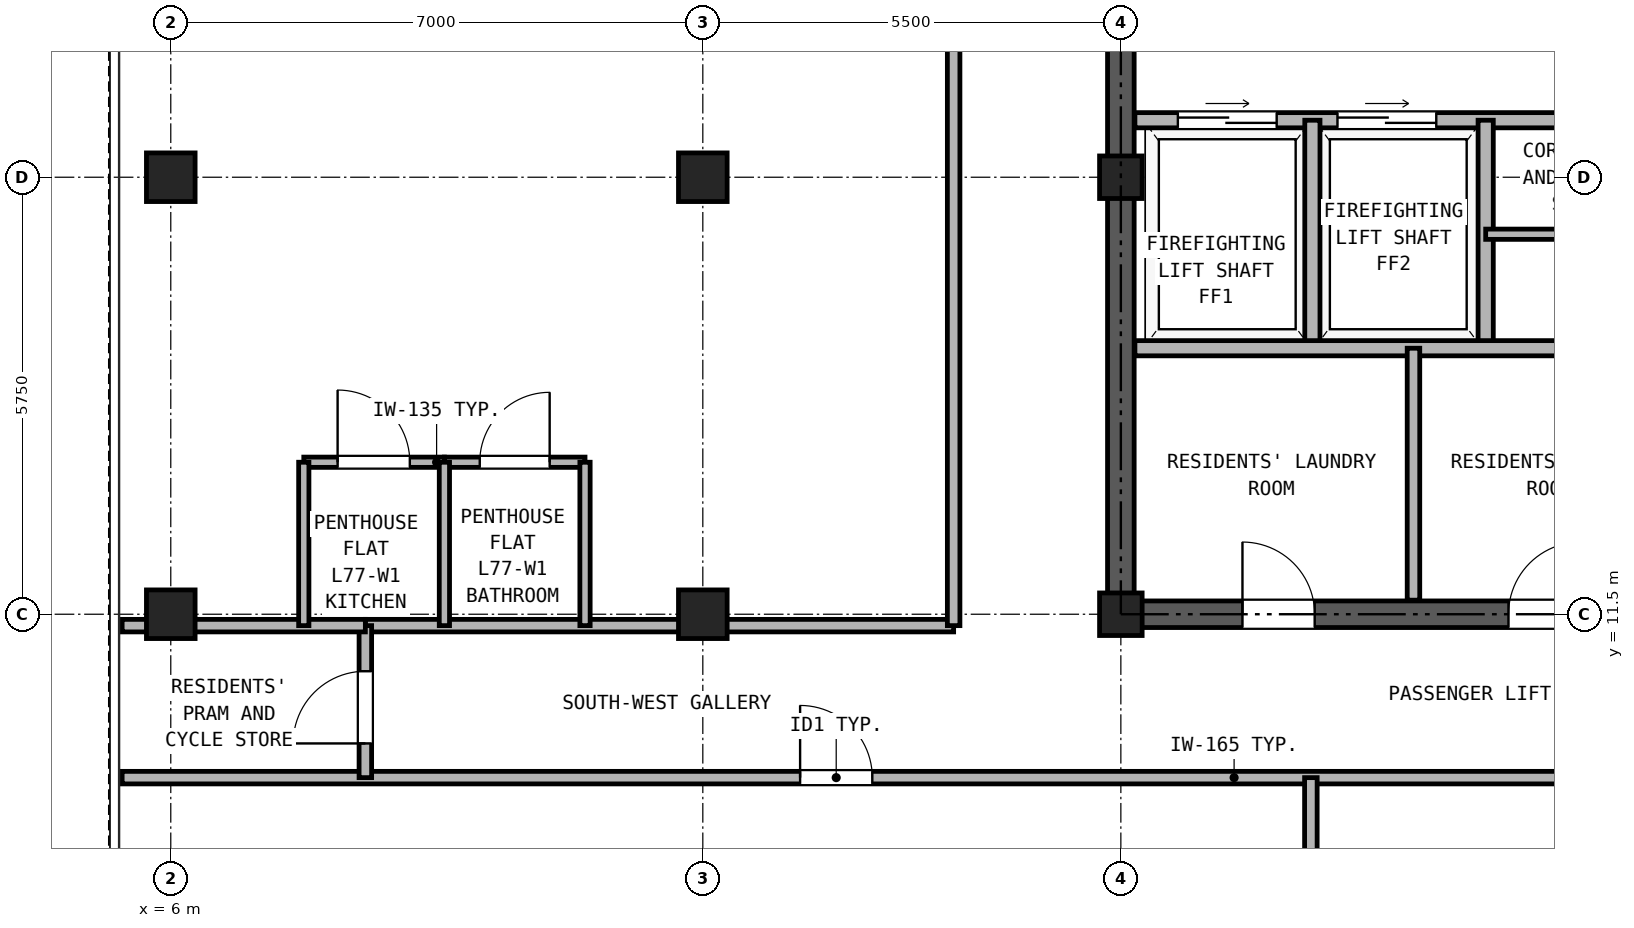
"""IFC4 building model, lengths in metres.
Left out: names, types, materials, properties, quantities, classifications, styles, units other than length and angle.
Written with IfcOpenShell. Run it as: python <this file> out.ifc"""

import sys

from ifc_helpers import new_model, si_unit, direction, frame, frame_2d, origin, origin_2d, place, context, subcontext, project, spatial, rectangle, hollow_rectangle, extrude, source, transform, mapped, element, fill, save


model = new_model("IFC4")
c1 = context("Model", 3, precision=1e-05, world=origin(), true_north=direction((0.0, 1.0)))
c2 = subcontext(c1, "Body", "Model", "MODEL_VIEW")
j1 = project(units=[si_unit("LENGTHUNIT", "METRE"), si_unit("PLANEANGLEUNIT", "RADIAN")], contexts=[c1])
p1 = place(None, origin())
s1 = spatial("IfcSite", under=j1, at=p1, CompositionType="ELEMENT")
p2 = place(p1, origin())
s2 = spatial("IfcBuilding", under=s1, at=p2, CompositionType="ELEMENT")
p3 = place(p2, frame((0.0, 0.0, 268.1)))
s3 = spatial("IfcBuildingStorey", under=s2, at=p3, CompositionType="ELEMENT", Elevation=268.1)
m1 = source(origin(), c2, "Body", "SweptSolid", [
    extrude(hollow_rectangle(XDim=0.64, YDim=0.64, WallThickness=0.035, at=origin_2d()), origin(), (0.0, 0.0, 1.0), 2.98),
])
for number, where, z_axis, x_axis in (
    (1, (6.0, 11.5, 0.0), (0.0, 0.0, 1.0), (1.0, 0.0, 0.0)),
    (2, (6.0, 17.25, 0.0), (0.0, 0.0, 1.0), (1.0, 0.0, 0.0)),
    (3, (13.0, 11.5, 0.0), (0.0, 0.0, 1.0), (1.0, 0.0, 0.0)),
    (4, (13.0, 17.25, 0.0), (0.0, 0.0, 1.0), (1.0, 0.0, 0.0)),
):
    element("IfcColumn", number, at=place(p3, frame(where, z_axis=z_axis, x_axis=x_axis)), inside=s3, PredefinedType="COLUMN", context=c2, shape_type="MappedRepresentation", body=[
        mapped(m1, transform((0.0, 0.0, 0.0), x_axis=(1.0, 0.0, 0.0), y_axis=(0.0, 1.0, 0.0), z_axis=(0.0, 0.0, 1.0), scale=1.0)),
    ])
m2 = source(origin(), c2, "Body", "SweptSolid", [
    extrude(hollow_rectangle(XDim=0.56, YDim=0.56, WallThickness=0.03, at=origin_2d()), origin(), (0.0, 0.0, 1.0), 2.98),
])
for number, where, z_axis, x_axis in (
    (5, (18.5, 11.5, 0.0), (0.0, 0.0, 1.0), (1.0, 0.0, 0.0)),
    (6, (18.5, 17.25, 0.0), (0.0, 0.0, 1.0), (1.0, 0.0, 0.0)),
):
    element("IfcColumn", number, at=place(p3, frame(where, z_axis=z_axis, x_axis=x_axis)), inside=s3, PredefinedType="COLUMN", context=c2, shape_type="MappedRepresentation", body=[
        mapped(m2, transform((0.0, 0.0, 0.0), x_axis=(1.0, 0.0, 0.0), y_axis=(0.0, 1.0, 0.0), z_axis=(0.0, 0.0, 1.0), scale=1.0)),
    ])
p4 = place(p3, frame((18.325, 11.5, 0.0), z_axis=(0.0, 0.0, 1.0), x_axis=(1.0, 0.0, 0.0)))
e7 = element("IfcWall", 7, at=p4, inside=s3, PredefinedType="SHEAR", context=c2, shape_type="SweptSolid", body=[
    extrude(rectangle(XDim=10.35, YDim=0.35, at=frame_2d((5.175, 0.0))), origin(), (0.0, 0.0, 1.0), 2.98),
])
p5 = place(p4, frame((1.775, 0.0, 0.0)))
e8 = element("IfcOpeningElement", 8, at=p5, cuts=e7, PredefinedType="OPENING", context=c2, shape_type="SweptSolid", body=[
    extrude(rectangle(XDim=0.95, YDim=2.15, at=frame_2d((0.475, 1.075))), frame((0.0, 0.185, 0.0), z_axis=(0.0, -1.0, 0.0), x_axis=(1.0, 0.0, 0.0)), (0.0, 0.0, 1.0), 0.37),
])
p6 = place(p4, frame((5.275, 0.0, 0.0)))
e9 = element("IfcOpeningElement", 9, at=p6, cuts=e7, PredefinedType="OPENING", context=c2, shape_type="SweptSolid", body=[
    extrude(rectangle(XDim=0.95, YDim=2.15, at=frame_2d((0.475, 1.075))), frame((0.0, 0.185, 0.0), z_axis=(0.0, -1.0, 0.0), x_axis=(1.0, 0.0, 0.0)), (0.0, 0.0, 1.0), 0.37),
])
p7 = place(p4, frame((8.175, 0.0, 0.0)))
e10 = element("IfcOpeningElement", 10, at=p7, cuts=e7, PredefinedType="OPENING", context=c2, shape_type="SweptSolid", body=[
    extrude(rectangle(XDim=1.1, YDim=2.25, at=frame_2d((0.55, 1.125))), frame((0.0, 0.185, 0.0), z_axis=(0.0, -1.0, 0.0), x_axis=(1.0, 0.0, 0.0)), (0.0, 0.0, 1.0), 0.37),
])
p8 = place(p3, frame((18.5, 11.675, 0.0), z_axis=(0.0, 0.0, 1.0), x_axis=(0.0, 1.0, 0.0)))
e11 = element("IfcWall", 11, at=p8, inside=s3, PredefinedType="SHEAR", context=c2, shape_type="SweptSolid", body=[
    extrude(rectangle(XDim=16.9, YDim=0.35, at=frame_2d((8.45, 0.0))), origin(), (0.0, 0.0, 1.0), 2.98),
])
p9 = place(p8, frame((7.475, 0.0, 0.0)))
e12 = element("IfcOpeningElement", 12, at=p9, cuts=e11, PredefinedType="OPENING", context=c2, shape_type="SweptSolid", body=[
    extrude(rectangle(XDim=1.15, YDim=2.2, at=frame_2d((0.575, 1.1))), frame((0.0, 0.185, 0.0), z_axis=(0.0, -1.0, 0.0), x_axis=(1.0, 0.0, 0.0)), (0.0, 0.0, 1.0), 0.37),
])
p10 = place(p3, frame((18.685, 18.0, 0.0), z_axis=(0.0, 0.0, 1.0), x_axis=(1.0, 0.0, 0.0)))
e13 = element("IfcWall", 13, at=p10, inside=s3, PredefinedType="PARTITIONING", context=c2, shape_type="SweptSolid", body=[
    extrude(rectangle(XDim=9.63, YDim=0.2, at=frame_2d((4.815, 0.0))), origin(), (0.0, 0.0, 1.0), 2.98),
])
p11 = place(p10, frame((0.565, 0.0, 0.0)))
e14 = element("IfcOpeningElement", 14, at=p11, cuts=e13, PredefinedType="OPENING", context=c2, shape_type="SweptSolid", body=[
    extrude(rectangle(XDim=1.3, YDim=2.3, at=frame_2d((0.65, 1.15))), frame((0.0, 0.11, 0.0), z_axis=(0.0, -1.0, 0.0), x_axis=(1.0, 0.0, 0.0)), (0.0, 0.0, 1.0), 0.22),
])
p12 = place(p10, frame((2.665, 0.0, 0.0)))
e15 = element("IfcOpeningElement", 15, at=p12, cuts=e13, PredefinedType="OPENING", context=c2, shape_type="SweptSolid", body=[
    extrude(rectangle(XDim=1.3, YDim=2.3, at=frame_2d((0.65, 1.15))), frame((0.0, 0.11, 0.0), z_axis=(0.0, -1.0, 0.0), x_axis=(1.0, 0.0, 0.0)), (0.0, 0.0, 1.0), 0.22),
])
p13 = place(p10, frame((7.165, 0.0, 0.0)))
e16 = element("IfcOpeningElement", 16, at=p13, cuts=e13, PredefinedType="OPENING", context=c2, shape_type="SweptSolid", body=[
    extrude(rectangle(XDim=1.0, YDim=2.15, at=frame_2d((0.5, 1.075))), frame((0.0, 0.11, 0.0), z_axis=(0.0, -1.0, 0.0), x_axis=(1.0, 0.0, 0.0)), (0.0, 0.0, 1.0), 0.22),
])
for number, where, z_axis, x_axis in (
    (17, (21.02, 15.0, 0.0), (0.0, 0.0, 1.0), (0.0, 1.0, 0.0)),
    (18, (23.3, 15.0, 0.0), (0.0, 0.0, 1.0), (0.0, 1.0, 0.0)),
):
    element("IfcWall", number, at=place(p3, frame(where, z_axis=z_axis, x_axis=x_axis)), inside=s3, PredefinedType="PARTITIONING", context=c2, shape_type="SweptSolid", body=[
        extrude(rectangle(XDim=3.0, YDim=0.2, at=frame_2d((1.5, 0.0))), origin(), (0.0, 0.0, 1.0), 2.98),
    ])
p14 = place(p3, frame((18.685, 15.0, 0.0), z_axis=(0.0, 0.0, 1.0), x_axis=(1.0, 0.0, 0.0)))
e19 = element("IfcWall", 19, at=p14, inside=s3, PredefinedType="PARTITIONING", context=c2, shape_type="SweptSolid", body=[
    extrude(rectangle(XDim=9.63, YDim=0.2, at=frame_2d((4.815, 0.0))), origin(), (0.0, 0.0, 1.0), 2.98),
])
p15 = place(p3, frame((23.3, 16.5, 0.0), z_axis=(0.0, 0.0, 1.0), x_axis=(1.0, 0.0, 0.0)))
e20 = element("IfcWall", 20, at=p15, inside=s3, PredefinedType="PARTITIONING", context=c2, shape_type="SweptSolid", body=[
    extrude(rectangle(XDim=5.015, YDim=0.135, at=frame_2d((2.507, 0.0))), origin(), (0.0, 0.0, 1.0), 2.98),
])
p16 = place(p15, frame((2.55, 0.0, 0.0)))
e21 = element("IfcOpeningElement", 21, at=p16, cuts=e20, PredefinedType="OPENING", context=c2, shape_type="SweptSolid", body=[
    extrude(rectangle(XDim=0.9, YDim=2.05, at=frame_2d((0.45, 1.025))), frame((0.0, 0.077, 0.0), z_axis=(0.0, -1.0, 0.0), x_axis=(1.0, 0.0, 0.0)), (0.0, 0.0, 1.0), 0.155),
])
p17 = place(p3, frame((22.35, 11.685, 0.0), z_axis=(0.0, 0.0, 1.0), x_axis=(0.0, 1.0, 0.0)))
e22 = element("IfcWall", 22, at=p17, inside=s3, PredefinedType="PARTITIONING", context=c2, shape_type="SweptSolid", body=[
    extrude(rectangle(XDim=3.315, YDim=0.165, at=frame_2d((1.657, 0.0))), origin(), (0.0, 0.0, 1.0), 2.98),
])
p18 = place(p3, frame((5.36, 9.35, 0.0), z_axis=(0.0, 0.0, 1.0), x_axis=(1.0, 0.0, 0.0)))
e23 = element("IfcWall", 23, at=p18, inside=s3, PredefinedType="PARTITIONING", context=c2, shape_type="SweptSolid", body=[
    extrude(rectangle(XDim=36.28, YDim=0.165, at=frame_2d((18.14, 0.0))), origin(), (0.0, 0.0, 1.0), 2.98),
])
p19 = place(p18, frame((8.92, 0.0, 0.0)))
e24 = element("IfcOpeningElement", 24, at=p19, cuts=e23, PredefinedType="OPENING", context=c2, shape_type="SweptSolid", body=[
    extrude(rectangle(XDim=0.95, YDim=2.15, at=frame_2d((0.475, 1.075))), frame((0.0, 0.093, 0.0), z_axis=(0.0, -1.0, 0.0), x_axis=(1.0, 0.0, 0.0)), (0.0, 0.0, 1.0), 0.185),
])
p20 = place(p18, frame((19.39, 0.0, 0.0)))
e25 = element("IfcOpeningElement", 25, at=p20, cuts=e23, PredefinedType="OPENING", context=c2, shape_type="SweptSolid", body=[
    extrude(rectangle(XDim=0.95, YDim=2.15, at=frame_2d((0.475, 1.075))), frame((0.0, 0.093, 0.0), z_axis=(0.0, -1.0, 0.0), x_axis=(1.0, 0.0, 0.0)), (0.0, 0.0, 1.0), 0.185),
])
p21 = place(p18, frame((25.99, 0.0, 0.0)))
e26 = element("IfcOpeningElement", 26, at=p21, cuts=e23, PredefinedType="OPENING", context=c2, shape_type="SweptSolid", body=[
    extrude(rectangle(XDim=0.95, YDim=2.15, at=frame_2d((0.475, 1.075))), frame((0.0, 0.093, 0.0), z_axis=(0.0, -1.0, 0.0), x_axis=(1.0, 0.0, 0.0)), (0.0, 0.0, 1.0), 0.185),
])
p22 = place(p18, frame((30.34, 0.0, 0.0)))
e27 = element("IfcOpeningElement", 27, at=p22, cuts=e23, PredefinedType="OPENING", context=c2, shape_type="SweptSolid", body=[
    extrude(rectangle(XDim=0.95, YDim=2.15, at=frame_2d((0.475, 1.075))), frame((0.0, 0.093, 0.0), z_axis=(0.0, -1.0, 0.0), x_axis=(1.0, 0.0, 0.0)), (0.0, 0.0, 1.0), 0.185),
])
p23 = place(p3, frame((8.56, 11.35, 0.0), z_axis=(0.0, 0.0, 1.0), x_axis=(1.0, 0.0, 0.0)))
e28 = element("IfcWall", 28, at=p23, inside=s3, PredefinedType="PARTITIONING", context=c2, shape_type="SweptSolid", body=[
    extrude(rectangle(XDim=7.74, YDim=0.165, at=frame_2d((3.87, 0.0))), origin(), (0.0, 0.0, 1.0), 2.428),
])
p24 = place(p3, frame((8.56, 9.35, 0.0), z_axis=(0.0, 0.0, 1.0), x_axis=(0.0, 1.0, 0.0)))
e29 = element("IfcWall", 29, at=p24, inside=s3, PredefinedType="PARTITIONING", context=c2, shape_type="SweptSolid", body=[
    extrude(rectangle(XDim=2.0, YDim=0.165, at=frame_2d((1.0, 0.0))), origin(), (0.0, 0.0, 1.0), 2.98),
])
p25 = place(p24, frame((0.45, 0.0, 0.0)))
e30 = element("IfcOpeningElement", 30, at=p25, cuts=e29, PredefinedType="OPENING", context=c2, shape_type="SweptSolid", body=[
    extrude(rectangle(XDim=0.95, YDim=2.15, at=frame_2d((0.475, 1.075))), frame((0.0, 0.093, 0.0), z_axis=(0.0, -1.0, 0.0), x_axis=(1.0, 0.0, 0.0)), (0.0, 0.0, 1.0), 0.185),
])
p26 = place(p3, frame((16.3, 11.35, 0.0), z_axis=(0.0, 0.0, 1.0), x_axis=(0.0, 1.0, 0.0)))
e31 = element("IfcWall", 31, at=p26, inside=s3, PredefinedType="PARTITIONING", context=c2, shape_type="SweptSolid", body=[
    extrude(rectangle(XDim=23.79, YDim=0.165, at=frame_2d((11.895, 0.0))), origin(), (0.0, 0.0, 1.0), 2.98),
])
p27 = place(p26, frame((9.15, 0.0, 0.0)))
e32 = element("IfcOpeningElement", 32, at=p27, cuts=e31, PredefinedType="OPENING", context=c2, shape_type="SweptSolid", body=[
    extrude(rectangle(XDim=1.0, YDim=2.15, at=frame_2d((0.5, 1.075))), frame((0.0, 0.093, 0.0), z_axis=(0.0, -1.0, 0.0), x_axis=(1.0, 0.0, 0.0)), (0.0, 0.0, 1.0), 0.185),
])
p28 = place(p3, frame((21.0, 0.16, 0.0), z_axis=(0.0, 0.0, 1.0), x_axis=(0.0, 1.0, 0.0)))
e33 = element("IfcWall", 33, at=p28, inside=s3, PredefinedType="PARTITIONING", context=c2, shape_type="SweptSolid", body=[
    extrude(rectangle(XDim=9.19, YDim=0.165, at=frame_2d((4.595, 0.0))), origin(), (0.0, 0.0, 1.0), 2.98),
])
p29 = place(p3, frame((5.36, 11.35, 0.0), z_axis=(0.0, 0.0, 1.0), x_axis=(1.0, 0.0, 0.0)))
e34 = element("IfcWall", 34, at=p29, inside=s3, PredefinedType="PARTITIONING", context=c2, shape_type="SweptSolid", body=[
    extrude(rectangle(XDim=3.2, YDim=0.165, at=frame_2d((1.6, 0.0))), origin(), (0.0, 0.0, 1.0), 2.428),
])
p30 = place(p3, frame((7.75, 13.5, 0.0), z_axis=(0.0, 0.0, 1.0), x_axis=(1.0, 0.0, 0.0)))
e35 = element("IfcWall", 35, at=p30, inside=s3, PredefinedType="PARTITIONING", context=c2, shape_type="SweptSolid", body=[
    extrude(rectangle(XDim=1.85, YDim=0.135, at=frame_2d((0.925, 0.0))), origin(), (0.0, 0.0, 1.0), 2.98),
])
p31 = place(p30, frame((0.445, 0.0, 0.0)))
e36 = element("IfcOpeningElement", 36, at=p31, cuts=e35, PredefinedType="OPENING", context=c2, shape_type="SweptSolid", body=[
    extrude(rectangle(XDim=0.95, YDim=2.15, at=frame_2d((0.475, 1.075))), frame((0.0, 0.077, 0.0), z_axis=(0.0, -1.0, 0.0), x_axis=(1.0, 0.0, 0.0)), (0.0, 0.0, 1.0), 0.155),
])
p32 = place(p3, frame((9.6, 13.5, 0.0), z_axis=(0.0, 0.0, 1.0), x_axis=(1.0, 0.0, 0.0)))
e37 = element("IfcWall", 37, at=p32, inside=s3, PredefinedType="PARTITIONING", context=c2, shape_type="SweptSolid", body=[
    extrude(rectangle(XDim=1.85, YDim=0.135, at=frame_2d((0.925, 0.0))), origin(), (0.0, 0.0, 1.0), 2.98),
])
p33 = place(p32, frame((0.465, 0.0, 0.0)))
e38 = element("IfcOpeningElement", 38, at=p33, cuts=e37, PredefinedType="OPENING", context=c2, shape_type="SweptSolid", body=[
    extrude(rectangle(XDim=0.92, YDim=2.1, at=frame_2d((0.46, 1.05))), frame((0.0, 0.077, 0.0), z_axis=(0.0, -1.0, 0.0), x_axis=(1.0, 0.0, 0.0)), (0.0, 0.0, 1.0), 0.155),
])
for number, where, z_axis, x_axis in (
    (39, (7.75, 11.35, 0.0), (0.0, 0.0, 1.0), (0.0, 1.0, 0.0)),
    (40, (9.6, 11.35, 0.0), (0.0, 0.0, 1.0), (0.0, 1.0, 0.0)),
    (41, (11.45, 11.35, 0.0), (0.0, 0.0, 1.0), (0.0, 1.0, 0.0)),
):
    element("IfcWall", number, at=place(p3, frame(where, z_axis=z_axis, x_axis=x_axis)), inside=s3, PredefinedType="PARTITIONING", context=c2, shape_type="SweptSolid", body=[
        extrude(rectangle(XDim=2.15, YDim=0.135, at=frame_2d((1.075, 0.0))), origin(), (0.0, 0.0, 1.0), 2.98),
    ])
p34 = place(p11, origin())
e42 = element("IfcDoor", 42, at=p34, inside=s3, OperationType="DOUBLE_DOOR_SLIDING", PredefinedType="DOOR", context=c2, shape_type="SweptSolid", body=[
    extrude(rectangle(XDim=1.3, YDim=2.3, at=frame_2d((0.65, 1.15))), frame((0.0, 0.025, 0.0), z_axis=(0.0, -1.0, 0.0), x_axis=(1.0, 0.0, 0.0)), (0.0, 0.0, 1.0), 0.05),
])
fill(e14, e42)
p35 = place(p12, origin())
e43 = element("IfcDoor", 43, at=p35, inside=s3, OperationType="DOUBLE_DOOR_SLIDING", PredefinedType="DOOR", context=c2, shape_type="SweptSolid", body=[
    extrude(rectangle(XDim=1.3, YDim=2.3, at=frame_2d((0.65, 1.15))), frame((0.0, 0.025, 0.0), z_axis=(0.0, -1.0, 0.0), x_axis=(1.0, 0.0, 0.0)), (0.0, 0.0, 1.0), 0.05),
])
fill(e15, e43)
p36 = place(p5, frame((0.95, 0.0, 0.0), z_axis=(0.0, 0.0, 1.0), x_axis=(-1.0, 0.0, 0.0)))
e44 = element("IfcDoor", 44, at=p36, inside=s3, OperationType="SINGLE_SWING_LEFT", PredefinedType="DOOR", context=c2, shape_type="SweptSolid", body=[
    extrude(rectangle(XDim=0.95, YDim=2.15, at=frame_2d((0.475, 1.075))), frame((0.0, 0.025, 0.0), z_axis=(0.0, -1.0, 0.0), x_axis=(1.0, 0.0, 0.0)), (0.0, 0.0, 1.0), 0.05),
])
fill(e8, e44)
p37 = place(p6, frame((0.95, 0.0, 0.0), z_axis=(0.0, 0.0, 1.0), x_axis=(-1.0, 0.0, 0.0)))
e45 = element("IfcDoor", 45, at=p37, inside=s3, OperationType="SINGLE_SWING_RIGHT", PredefinedType="DOOR", context=c2, shape_type="SweptSolid", body=[
    extrude(rectangle(XDim=0.95, YDim=2.15, at=frame_2d((0.475, 1.075))), frame((0.0, 0.025, 0.0), z_axis=(0.0, -1.0, 0.0), x_axis=(1.0, 0.0, 0.0)), (0.0, 0.0, 1.0), 0.05),
])
fill(e9, e45)
p38 = place(p19, frame((0.95, 0.0, 0.0), z_axis=(0.0, 0.0, 1.0), x_axis=(-1.0, 0.0, 0.0)))
e46 = element("IfcDoor", 46, at=p38, inside=s3, OperationType="SINGLE_SWING_LEFT", PredefinedType="DOOR", context=c2, shape_type="SweptSolid", body=[
    extrude(rectangle(XDim=0.95, YDim=2.15, at=frame_2d((0.475, 1.075))), frame((0.0, 0.025, 0.0), z_axis=(0.0, -1.0, 0.0), x_axis=(1.0, 0.0, 0.0)), (0.0, 0.0, 1.0), 0.05),
])
fill(e24, e46)
p39 = place(p25, frame((0.95, 0.0, 0.0), z_axis=(0.0, 0.0, 1.0), x_axis=(-1.0, 0.0, 0.0)))
e47 = element("IfcDoor", 47, at=p39, inside=s3, OperationType="SINGLE_SWING_LEFT", PredefinedType="DOOR", context=c2, shape_type="SweptSolid", body=[
    extrude(rectangle(XDim=0.95, YDim=2.15, at=frame_2d((0.475, 1.075))), frame((0.0, 0.025, 0.0), z_axis=(0.0, -1.0, 0.0), x_axis=(1.0, 0.0, 0.0)), (0.0, 0.0, 1.0), 0.05),
])
fill(e30, e47)
p40 = place(p31, origin())
e48 = element("IfcDoor", 48, at=p40, inside=s3, OperationType="SINGLE_SWING_LEFT", PredefinedType="DOOR", context=c2, shape_type="SweptSolid", body=[
    extrude(rectangle(XDim=0.95, YDim=2.15, at=frame_2d((0.475, 1.075))), frame((0.0, 0.025, 0.0), z_axis=(0.0, -1.0, 0.0), x_axis=(1.0, 0.0, 0.0)), (0.0, 0.0, 1.0), 0.05),
])
fill(e36, e48)
p41 = place(p33, origin())
e49 = element("IfcDoor", 49, at=p41, inside=s3, OperationType="SINGLE_SWING_RIGHT", PredefinedType="DOOR", context=c2, shape_type="SweptSolid", body=[
    extrude(rectangle(XDim=0.92, YDim=2.1, at=frame_2d((0.46, 1.05))), frame((0.0, 0.025, 0.0), z_axis=(0.0, -1.0, 0.0), x_axis=(1.0, 0.0, 0.0)), (0.0, 0.0, 1.0), 0.05),
])
fill(e38, e49)
save(model, sys.argv[1])
